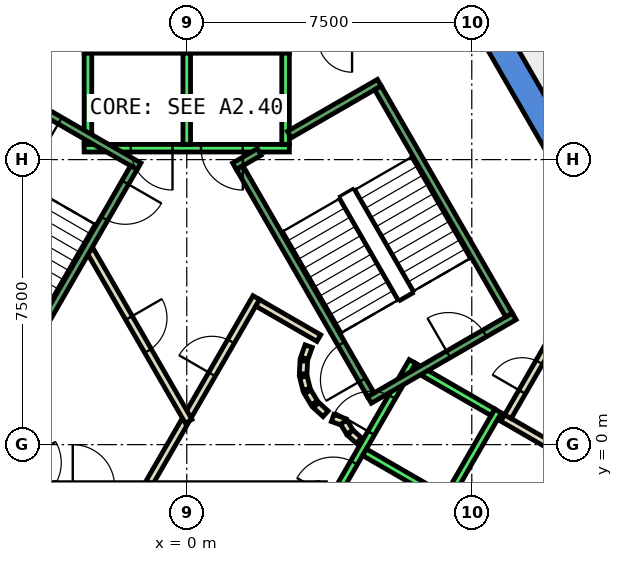
"""IFC4 building model, lengths in metres.
Left out: names, types, materials, properties, quantities, classifications, styles, units other than length and angle.
Written with IfcOpenShell. Run it as: python <this file> out.ifc"""

import sys

from ifc_helpers import new_model, si_unit, direction, frame, frame_2d, origin, place, context, subcontext, project, spatial, polyline, rectangle, outline, extrude, element, fill, save


model = new_model("IFC4")
c1 = context("Model", 3, precision=1e-05, world=origin(), true_north=direction((0.0, 1.0)))
c2 = subcontext(c1, "Body", "Model", "MODEL_VIEW")
j1 = project(units=[si_unit("LENGTHUNIT", "METRE"), si_unit("PLANEANGLEUNIT", "RADIAN")], contexts=[c1])
p1 = place(None, origin())
s1 = spatial("IfcSite", under=j1, at=p1, CompositionType="ELEMENT")
p2 = place(p1, origin())
s2 = spatial("IfcBuilding", under=s1, at=p2, CompositionType="ELEMENT")
p3 = place(p2, frame((0.0, 0.0, 194.0)))
s3 = spatial("IfcBuildingStorey", under=s2, at=p3, CompositionType="ELEMENT", Elevation=194.0)
p4 = place(p3, frame((0.0, 0.0, -0.4)))
e1 = element("IfcWall", 1, at=p4, inside=s3, PredefinedType="SHEAR", context=c2, shape_type="SweptSolid", body=[
    extrude(outline(polyline([(8.084, 11.498), (7.478, 11.148), (12.471, 2.5), (13.279, 2.5), (8.084, 11.498)])), origin(), (0.0, 0.0, 1.0), 4.2),
])
p5 = place(p3, frame((0.0, 0.0, -0.4)))
e2 = element("IfcWall", 2, at=p5, inside=s3, PredefinedType="SHEAR", context=c2, shape_type="SweptSolid", body=[
    extrude(outline(polyline([(6.64, -9.0), (13.279, 2.5), (12.471, 2.5), (6.235, -8.3), (6.64, -9.0)])), origin(), (0.0, 0.0, 1.0), 4.2),
])
p6 = place(p3, frame((10.653, -0.648, 0.0), z_axis=(0.0, 0.0, 1.0), x_axis=(-0.866036505625, 0.499980770555, 0.0)))
e3 = element("IfcWall", 3, at=p6, inside=s3, PredefinedType="PARTITIONING", context=c2, shape_type="SweptSolid", body=[
    extrude(rectangle(XDim=2.7, YDim=0.2, at=frame_2d((1.35, 0.0))), origin(), (0.0, 0.0, 1.0), 3.8),
])
p7 = place(p3, frame((8.451, 0.738, 0.0), z_axis=(0.0, 0.0, 1.0), x_axis=(0.499913221443, 0.866075499611, 0.0)))
e4 = element("IfcWall", 4, at=p7, inside=s3, PredefinedType="PARTITIONING", context=c2, shape_type="SweptSolid", body=[
    extrude(rectangle(XDim=2.4, YDim=0.2, at=frame_2d((1.2, 0.0))), origin(), (0.0, 0.0, 1.0), 3.8),
])
p8 = place(p7, frame((0.75, 0.0, 0.0)))
e5 = element("IfcOpeningElement", 5, at=p8, cuts=e4, PredefinedType="OPENING", context=c2, shape_type="SweptSolid", body=[
    extrude(rectangle(XDim=0.9, YDim=2.1, at=frame_2d((0.45, 1.05))), frame((0.0, 0.11, 0.0), z_axis=(0.0, -1.0, 0.0), x_axis=(1.0, 0.0, 0.0)), (0.0, 0.0, 1.0), 0.22),
])
p9 = place(p3, frame((-0.982, -1.0, 0.0), z_axis=(0.0, 0.0, 1.0), x_axis=(0.50024047865, 0.865886518847, 0.0)))
e6 = element("IfcWall", 6, at=p9, inside=s3, PredefinedType="PARTITIONING", context=c2, shape_type="SweptSolid", body=[
    extrude(rectangle(XDim=1.863, YDim=0.2, at=frame_2d((0.931, 0.0))), origin(), (0.0, 0.0, 1.0), 3.8),
])
p10 = place(p3, frame((0.05, 0.787, 0.0), z_axis=(0.0, 0.0, 1.0), x_axis=(0.499954076797, 0.866051915934, 0.0)))
e7 = element("IfcWall", 7, at=p10, inside=s3, PredefinedType="PARTITIONING", context=c2, shape_type="SweptSolid", body=[
    extrude(rectangle(XDim=3.558, YDim=0.2, at=frame_2d((1.779, 0.0))), origin(), (0.0, 0.0, 1.0), 3.8),
])
p11 = place(p10, frame((1.229, 0.0, 0.0)))
e8 = element("IfcOpeningElement", 8, at=p11, cuts=e7, PredefinedType="OPENING", context=c2, shape_type="SweptSolid", body=[
    extrude(rectangle(XDim=1.0, YDim=2.1, at=frame_2d((0.5, 1.05))), frame((0.0, 0.11, 0.0), z_axis=(0.0, -1.0, 0.0), x_axis=(1.0, 0.0, 0.0)), (0.0, 0.0, 1.0), 0.22),
])
p12 = place(p3, frame((1.866, 3.732, 0.0), z_axis=(0.0, 0.0, 1.0), x_axis=(0.866043361281, -0.499968895414, 0.0)))
e9 = element("IfcWall", 9, at=p12, inside=s3, PredefinedType="PARTITIONING", context=c2, shape_type="SweptSolid", body=[
    extrude(rectangle(XDim=1.858, YDim=0.2, at=frame_2d((0.929, 0.0))), origin(), (0.0, 0.0, 1.0), 3.8),
])
p13 = place(p3, frame((3.208, 2.592, 0.0), z_axis=(0.0, 0.0, 1.0), x_axis=(-0.337388820924, -0.941365382578, 0.0)))
e10 = element("IfcWall", 10, at=p13, inside=s3, PredefinedType="PARTITIONING", context=c2, shape_type="SweptSolid", body=[
    extrude(rectangle(XDim=0.338, YDim=0.2, at=frame_2d((0.169, 0.0))), origin(), (0.0, 0.0, 1.0), 3.8),
])
p14 = place(p3, frame((3.079, 2.199, 0.0), z_axis=(0.0, 0.0, 1.0), x_axis=(-0.047771483479, -0.998858290933, 0.0)))
e11 = element("IfcWall", 11, at=p14, inside=s3, PredefinedType="PARTITIONING", context=c2, shape_type="SweptSolid", body=[
    extrude(rectangle(XDim=0.337, YDim=0.2, at=frame_2d((0.169, 0.0))), origin(), (0.0, 0.0, 1.0), 3.8),
])
p15 = place(p3, frame((3.07, 1.786, 0.0), z_axis=(0.0, 0.0, 1.0), x_axis=(0.242705583207, -0.970099994784, 0.0)))
e12 = element("IfcWall", 12, at=p15, inside=s3, PredefinedType="PARTITIONING", context=c2, shape_type="SweptSolid", body=[
    extrude(rectangle(XDim=0.338, YDim=0.2, at=frame_2d((0.169, 0.0))), origin(), (0.0, 0.0, 1.0), 3.8),
])
for number, where, z_axis, x_axis in (
    (13, (3.182, 1.388, 0.0), (0.0, 0.0, 1.0), (0.512, -0.859, 0.0)),
    (14, (3.404, 1.039, 0.0), (0.0, 0.0, 1.0), (0.74, -0.672, 0.0)),
):
    element("IfcWall", number, at=place(p3, frame(where, z_axis=z_axis, x_axis=x_axis)), inside=s3, PredefinedType="PARTITIONING", context=c2, shape_type="SweptSolid", body=[
        extrude(rectangle(XDim=0.338, YDim=0.2, at=frame_2d((0.169, 0.0))), origin(), (0.0, 0.0, 1.0), 3.8),
    ])
p16 = place(p3, frame((3.838, 0.702, 0.0), z_axis=(0.0, 0.0, 1.0), x_axis=(0.941035081519, -0.338308993895, 0.0)))
e15 = element("IfcWall", 15, at=p16, inside=s3, PredefinedType="PARTITIONING", context=c2, shape_type="SweptSolid", body=[
    extrude(rectangle(XDim=0.337, YDim=0.2, at=frame_2d((0.168, 0.0))), origin(), (0.0, 0.0, 1.0), 3.8),
])
p17 = place(p3, frame((4.132, 0.593, 0.0), z_axis=(0.0, 0.0, 1.0), x_axis=(0.513561617048, -0.858052717201, 0.0)))
e16 = element("IfcWall", 16, at=p17, inside=s3, PredefinedType="PARTITIONING", context=c2, shape_type="SweptSolid", body=[
    extrude(rectangle(XDim=0.308, YDim=0.2, at=frame_2d((0.154, 0.0))), origin(), (0.0, 0.0, 1.0), 3.8),
])
p18 = place(p3, frame((4.301, 0.315, 0.0), z_axis=(0.0, 0.0, 1.0), x_axis=(0.741798017506, -0.670623367639, 0.0)))
e17 = element("IfcWall", 17, at=p18, inside=s3, PredefinedType="PARTITIONING", context=c2, shape_type="SweptSolid", body=[
    extrude(rectangle(XDim=0.309, YDim=0.2, at=frame_2d((0.154, 0.0))), origin(), (0.0, 0.0, 1.0), 3.8),
])
p19 = place(p3, frame((-2.54, 5.1, 0.0), z_axis=(0.0, 0.0, 1.0), x_axis=(0.499925051871, -0.866068670783, 0.0)))
e18 = element("IfcWall", 18, at=p19, inside=s3, PredefinedType="PARTITIONING", context=c2, shape_type="SweptSolid", body=[
    extrude(rectangle(XDim=5.181, YDim=0.2, at=frame_2d((2.59, 0.0))), origin(), (0.0, 0.0, 1.0), 3.8),
])
p20 = place(p19, frame((2.04, 0.0, 0.0)))
e19 = element("IfcOpeningElement", 19, at=p20, cuts=e18, PredefinedType="OPENING", context=c2, shape_type="SweptSolid", body=[
    extrude(rectangle(XDim=1.0, YDim=2.1, at=frame_2d((0.5, 1.05))), frame((0.0, 0.11, 0.0), z_axis=(0.0, -1.0, 0.0), x_axis=(1.0, 0.0, 0.0)), (0.0, 0.0, 1.0), 0.22),
])
p21 = place(p3, frame((2.7, 7.8, 0.0), z_axis=(0.0, 0.0, 1.0), x_axis=(-1.0, 0.0, 0.0)))
e20 = element("IfcWall", 20, at=p21, inside=s3, PredefinedType="STANDARD", context=c2, shape_type="SweptSolid", body=[
    extrude(rectangle(XDim=5.4, YDim=0.2, at=frame_2d((2.7, 0.0))), origin(), (0.0, 0.0, 1.0), 3.8),
])
p22 = place(p21, frame((1.225, 0.0, 0.0)))
e21 = element("IfcOpeningElement", 21, at=p22, cuts=e20, PredefinedType="OPENING", context=c2, shape_type="SweptSolid", body=[
    extrude(rectangle(XDim=1.1, YDim=2.1, at=frame_2d((0.55, 1.05))), frame((0.0, 0.11, 0.0), z_axis=(0.0, -1.0, 0.0), x_axis=(1.0, 0.0, 0.0)), (0.0, 0.0, 1.0), 0.22),
])
p23 = place(p21, frame((3.075, 0.0, 0.0)))
e22 = element("IfcOpeningElement", 22, at=p23, cuts=e20, PredefinedType="OPENING", context=c2, shape_type="SweptSolid", body=[
    extrude(rectangle(XDim=1.1, YDim=2.1, at=frame_2d((0.55, 1.05))), frame((0.0, 0.11, 0.0), z_axis=(0.0, -1.0, 0.0), x_axis=(1.0, 0.0, 0.0)), (0.0, 0.0, 1.0), 0.22),
])
p24 = place(p3, frame((2.7, 10.4, 0.0), z_axis=(0.0, 0.0, 1.0), x_axis=(-1.0, 0.0, 0.0)))
e23 = element("IfcWall", 23, at=p24, inside=s3, PredefinedType="STANDARD", context=c2, shape_type="SweptSolid", body=[
    extrude(rectangle(XDim=5.4, YDim=0.2, at=frame_2d((2.7, 0.0))), origin(), (0.0, 0.0, 1.0), 3.8),
])
for number, where, z_axis, x_axis in (
    (24, (2.6, 7.9, 0.0), (0.0, 0.0, 1.0), (0.0, 1.0, 0.0)),
    (25, (0.0, 7.9, 0.0), (0.0, 0.0, 1.0), (0.0, 1.0, 0.0)),
    (26, (-2.6, 7.9, 0.0), (0.0, 0.0, 1.0), (0.0, 1.0, 0.0)),
):
    element("IfcWall", number, at=place(p3, frame(where, z_axis=z_axis, x_axis=x_axis)), inside=s3, PredefinedType="STANDARD", context=c2, shape_type="SweptSolid", body=[
        extrude(rectangle(XDim=2.4, YDim=0.2, at=frame_2d((1.2, 0.0))), origin(), (0.0, 0.0, 1.0), 3.8),
    ])
p25 = place(p3, frame((-5.94, 2.188, 0.0), z_axis=(0.0, 0.0, 1.0), x_axis=(0.500034260056, -0.866005622828, 0.0)))
e27 = element("IfcWall", 27, at=p25, inside=s3, PredefinedType="STANDARD", context=c2, shape_type="SweptSolid", body=[
    extrude(rectangle(XDim=5.399, YDim=0.2, at=frame_2d((2.7, 0.0))), origin(), (0.0, 0.0, 1.0), 3.8),
])
p26 = place(p25, frame((3.075, 0.0, 0.0)))
e28 = element("IfcOpeningElement", 28, at=p26, cuts=e27, PredefinedType="OPENING", context=c2, shape_type="SweptSolid", body=[
    extrude(rectangle(XDim=1.1, YDim=2.1, at=frame_2d((0.55, 1.05))), frame((0.0, 0.11, 0.0), z_axis=(0.0, -1.0, 0.0), x_axis=(1.0, 0.0, 0.0)), (0.0, 0.0, 1.0), 0.22),
])
p27 = place(p25, frame((1.225, 0.0, 0.0)))
e29 = element("IfcOpeningElement", 29, at=p27, cuts=e27, PredefinedType="OPENING", context=c2, shape_type="SweptSolid", body=[
    extrude(rectangle(XDim=1.1, YDim=2.1, at=frame_2d((0.55, 1.05))), frame((0.0, 0.11, 0.0), z_axis=(0.0, -1.0, 0.0), x_axis=(1.0, 0.0, 0.0)), (0.0, 0.0, 1.0), 0.22),
])
p28 = place(p3, frame((3.24, -2.488, 0.0), z_axis=(0.0, 0.0, 1.0), x_axis=(0.500034260056, 0.866005622828, 0.0)))
e30 = element("IfcWall", 30, at=p28, inside=s3, PredefinedType="STANDARD", context=c2, shape_type="SweptSolid", body=[
    extrude(rectangle(XDim=5.399, YDim=0.2, at=frame_2d((2.7, 0.0))), origin(), (0.0, 0.0, 1.0), 3.8),
])
p29 = place(p28, frame((3.225, 0.0, 0.0)))
e31 = element("IfcOpeningElement", 31, at=p29, cuts=e30, PredefinedType="OPENING", context=c2, shape_type="SweptSolid", body=[
    extrude(rectangle(XDim=1.1, YDim=2.1, at=frame_2d((0.55, 1.05))), frame((0.0, 0.11, 0.0), z_axis=(0.0, -1.0, 0.0), x_axis=(1.0, 0.0, 0.0)), (0.0, 0.0, 1.0), 0.22),
])
p30 = place(p28, frame((1.225, 0.0, 0.0)))
e32 = element("IfcOpeningElement", 32, at=p30, cuts=e30, PredefinedType="OPENING", context=c2, shape_type="SweptSolid", body=[
    extrude(rectangle(XDim=1.1, YDim=2.1, at=frame_2d((0.55, 1.05))), frame((0.0, 0.11, 0.0), z_axis=(0.0, -1.0, 0.0), x_axis=(1.0, 0.0, 0.0)), (0.0, 0.0, 1.0), 0.22),
])
p31 = place(p3, frame((5.492, -3.788, 0.0), z_axis=(0.0, 0.0, 1.0), x_axis=(0.500034260056, 0.866005622828, 0.0)))
e33 = element("IfcWall", 33, at=p31, inside=s3, PredefinedType="STANDARD", context=c2, shape_type="SweptSolid", body=[
    extrude(rectangle(XDim=5.399, YDim=0.2, at=frame_2d((2.7, 0.0))), origin(), (0.0, 0.0, 1.0), 3.8),
])
for number, where, z_axis, x_axis in (
    (34, (4.677, -0.2, 0.0), (0.0, 0.0, 1.0), (0.866, -0.5, 0.0)),
    (35, (5.977, 2.052, 0.0), (0.0, 0.0, 1.0), (0.866, -0.5, 0.0)),
):
    element("IfcWall", number, at=place(p3, frame(where, z_axis=z_axis, x_axis=x_axis)), inside=s3, PredefinedType="STANDARD", context=c2, shape_type="SweptSolid", body=[
        extrude(rectangle(XDim=2.399, YDim=0.2, at=frame_2d((1.2, 0.0))), origin(), (0.0, 0.0, 1.0), 3.8),
    ])
p32 = place(p3, frame((4.806, 1.176, 0.0), z_axis=(0.0, 0.0, 1.0), x_axis=(0.866059941101, 0.499940174841, 0.0)))
e36 = element("IfcWall", 36, at=p32, inside=s3, PredefinedType="STANDARD", context=c2, shape_type="SweptSolid", body=[
    extrude(rectangle(XDim=4.4, YDim=0.2, at=frame_2d((2.2, 0.0))), origin(), (0.0, 0.0, 1.0), 3.8),
])
p33 = place(p32, frame((2.4, 0.0, 0.0)))
e37 = element("IfcOpeningElement", 37, at=p33, cuts=e36, PredefinedType="OPENING", context=c2, shape_type="SweptSolid", body=[
    extrude(rectangle(XDim=1.1, YDim=2.2, at=frame_2d((0.55, 1.1))), frame((0.0, 0.11, 0.0), z_axis=(0.0, -1.0, 0.0), x_axis=(1.0, 0.0, 0.0)), (0.0, 0.0, 1.0), 0.22),
])
p34 = place(p3, frame((2.7, 8.158, 0.0), z_axis=(0.0, 0.0, 1.0), x_axis=(0.86611865017, 0.499838457731, 0.0)))
e38 = element("IfcWall", 38, at=p34, inside=s3, PredefinedType="STANDARD", context=c2, shape_type="SweptSolid", body=[
    extrude(rectangle(XDim=2.733, YDim=0.2, at=frame_2d((1.366, 0.0))), origin(), (0.0, 0.0, 1.0), 3.8),
])
p35 = place(p3, frame((1.256, 7.324, 0.0), z_axis=(0.0, 0.0, 1.0), x_axis=(0.865915093549, 0.500191014278, 0.0)))
e39 = element("IfcWall", 39, at=p35, inside=s3, PredefinedType="STANDARD", context=c2, shape_type="SweptSolid", body=[
    extrude(rectangle(XDim=0.752, YDim=0.2, at=frame_2d((0.376, 0.0))), origin(), (0.0, 0.0, 1.0), 3.8),
])
p36 = place(p3, frame((4.843, 1.312, 0.0), z_axis=(0.0, 0.0, 1.0), x_axis=(-0.499963383562, 0.866046543262, 0.0)))
e40 = element("IfcWall", 40, at=p36, inside=s3, PredefinedType="STANDARD", context=c2, shape_type="SweptSolid", body=[
    extrude(rectangle(XDim=6.9, YDim=0.2, at=frame_2d((3.45, 0.0))), origin(), (0.0, 0.0, 1.0), 3.8),
])
p37 = place(p36, frame((0.45, 0.0, 0.0)))
e41 = element("IfcOpeningElement", 41, at=p37, cuts=e40, PredefinedType="OPENING", context=c2, shape_type="SweptSolid", body=[
    extrude(rectangle(XDim=1.1, YDim=2.2, at=frame_2d((0.55, 1.1))), frame((0.0, 0.11, 0.0), z_axis=(0.0, -1.0, 0.0), x_axis=(1.0, 0.0, 0.0)), (0.0, 0.0, 1.0), 0.22),
])
p38 = place(p3, frame((8.48, 3.412, 0.0), z_axis=(0.0, 0.0, 1.0), x_axis=(-0.499978703459, 0.866037698999, 0.0)))
e42 = element("IfcWall", 42, at=p38, inside=s3, PredefinedType="STANDARD", context=c2, shape_type="SweptSolid", body=[
    extrude(rectangle(XDim=6.9, YDim=0.2, at=frame_2d((3.45, 0.0))), origin(), (0.0, 0.0, 1.0), 3.8),
])
p39 = place(p3, frame((-1.256, 7.324, 0.0), z_axis=(0.0, 0.0, 1.0), x_axis=(-0.866046073146, 0.499964197906, 0.0)))
e43 = element("IfcWall", 43, at=p39, inside=s3, PredefinedType="STANDARD", context=c2, shape_type="SweptSolid", body=[
    extrude(rectangle(XDim=4.4, YDim=0.2, at=frame_2d((2.2, 0.0))), origin(), (0.0, 0.0, 1.0), 3.8),
])
p40 = place(p39, frame((2.4, 0.0, 0.0)))
e44 = element("IfcOpeningElement", 44, at=p40, cuts=e43, PredefinedType="OPENING", context=c2, shape_type="SweptSolid", body=[
    extrude(rectangle(XDim=1.1, YDim=2.2, at=frame_2d((0.55, 1.1))), frame((0.0, 0.11, 0.0), z_axis=(0.0, -1.0, 0.0), x_axis=(1.0, 0.0, 0.0)), (0.0, 0.0, 1.0), 0.22),
])
p41 = place(p3, frame((-1.393, 7.288, 0.0), z_axis=(0.0, 0.0, 1.0), x_axis=(-0.499963383562, -0.866046543262, 0.0)))
e45 = element("IfcWall", 45, at=p41, inside=s3, PredefinedType="STANDARD", context=c2, shape_type="SweptSolid", body=[
    extrude(rectangle(XDim=6.9, YDim=0.2, at=frame_2d((3.45, 0.0))), origin(), (0.0, 0.0, 1.0), 3.8),
])
p42 = place(p41, frame((0.45, 0.0, 0.0)))
e46 = element("IfcOpeningElement", 46, at=p42, cuts=e45, PredefinedType="OPENING", context=c2, shape_type="SweptSolid", body=[
    extrude(rectangle(XDim=1.1, YDim=2.2, at=frame_2d((0.55, 1.1))), frame((0.0, 0.11, 0.0), z_axis=(0.0, -1.0, 0.0), x_axis=(1.0, 0.0, 0.0)), (0.0, 0.0, 1.0), 0.22),
])
p43 = place(p11, origin())
e47 = element("IfcDoor", 47, at=p43, inside=s3, OperationType="SINGLE_SWING_RIGHT", PredefinedType="DOOR", context=c2, shape_type="SweptSolid", body=[
    extrude(rectangle(XDim=1.0, YDim=2.1, at=frame_2d((0.5, 1.05))), frame((0.0, 0.025, 0.0), z_axis=(0.0, -1.0, 0.0), x_axis=(1.0, 0.0, 0.0)), (0.0, 0.0, 1.0), 0.05),
])
fill(e8, e47)
p44 = place(p20, origin())
e48 = element("IfcDoor", 48, at=p44, inside=s3, OperationType="SINGLE_SWING_RIGHT", PredefinedType="DOOR", context=c2, shape_type="SweptSolid", body=[
    extrude(rectangle(XDim=1.0, YDim=2.1, at=frame_2d((0.5, 1.05))), frame((0.0, 0.025, 0.0), z_axis=(0.0, -1.0, 0.0), x_axis=(1.0, 0.0, 0.0)), (0.0, 0.0, 1.0), 0.05),
])
fill(e19, e48)
p45 = place(p8, origin())
e49 = element("IfcDoor", 49, at=p45, inside=s3, OperationType="SINGLE_SWING_LEFT", PredefinedType="DOOR", context=c2, shape_type="SweptSolid", body=[
    extrude(rectangle(XDim=0.9, YDim=2.1, at=frame_2d((0.45, 1.05))), frame((0.0, 0.025, 0.0), z_axis=(0.0, -1.0, 0.0), x_axis=(1.0, 0.0, 0.0)), (0.0, 0.0, 1.0), 0.05),
])
fill(e5, e49)
p46 = place(p22, origin())
e50 = element("IfcDoor", 50, at=p46, inside=s3, OperationType="SLIDING_TO_LEFT", PredefinedType="DOOR", context=c2, shape_type="SweptSolid", body=[
    extrude(rectangle(XDim=1.1, YDim=2.1, at=frame_2d((0.55, 1.05))), frame((0.0, 0.025, 0.0), z_axis=(0.0, -1.0, 0.0), x_axis=(1.0, 0.0, 0.0)), (0.0, 0.0, 1.0), 0.05),
])
fill(e21, e50)
p47 = place(p23, origin())
e51 = element("IfcDoor", 51, at=p47, inside=s3, OperationType="SLIDING_TO_LEFT", PredefinedType="DOOR", context=c2, shape_type="SweptSolid", body=[
    extrude(rectangle(XDim=1.1, YDim=2.1, at=frame_2d((0.55, 1.05))), frame((0.0, 0.025, 0.0), z_axis=(0.0, -1.0, 0.0), x_axis=(1.0, 0.0, 0.0)), (0.0, 0.0, 1.0), 0.05),
])
fill(e22, e51)
p48 = place(p29, origin())
e52 = element("IfcDoor", 52, at=p48, inside=s3, OperationType="SLIDING_TO_LEFT", PredefinedType="DOOR", context=c2, shape_type="SweptSolid", body=[
    extrude(rectangle(XDim=1.1, YDim=2.1, at=frame_2d((0.55, 1.05))), frame((0.0, 0.025, 0.0), z_axis=(0.0, -1.0, 0.0), x_axis=(1.0, 0.0, 0.0)), (0.0, 0.0, 1.0), 0.05),
])
fill(e31, e52)
p49 = place(p30, origin())
e53 = element("IfcDoor", 53, at=p49, inside=s3, OperationType="SLIDING_TO_LEFT", PredefinedType="DOOR", context=c2, shape_type="SweptSolid", body=[
    extrude(rectangle(XDim=1.1, YDim=2.1, at=frame_2d((0.55, 1.05))), frame((0.0, 0.025, 0.0), z_axis=(0.0, -1.0, 0.0), x_axis=(1.0, 0.0, 0.0)), (0.0, 0.0, 1.0), 0.05),
])
fill(e32, e53)
p50 = place(p37, origin())
e54 = element("IfcDoor", 54, at=p50, inside=s3, OperationType="SINGLE_SWING_LEFT", PredefinedType="DOOR", context=c2, shape_type="SweptSolid", body=[
    extrude(rectangle(XDim=1.1, YDim=2.2, at=frame_2d((0.55, 1.1))), frame((0.0, 0.025, 0.0), z_axis=(0.0, -1.0, 0.0), x_axis=(1.0, 0.0, 0.0)), (0.0, 0.0, 1.0), 0.05),
])
fill(e41, e54)
p51 = place(p33, origin())
e55 = element("IfcDoor", 55, at=p51, inside=s3, OperationType="SINGLE_SWING_LEFT", PredefinedType="DOOR", context=c2, shape_type="SweptSolid", body=[
    extrude(rectangle(XDim=1.1, YDim=2.2, at=frame_2d((0.55, 1.1))), frame((0.0, 0.025, 0.0), z_axis=(0.0, -1.0, 0.0), x_axis=(1.0, 0.0, 0.0)), (0.0, 0.0, 1.0), 0.05),
])
fill(e37, e55)
p52 = place(p42, origin())
e56 = element("IfcDoor", 56, at=p52, inside=s3, OperationType="SINGLE_SWING_LEFT", PredefinedType="DOOR", context=c2, shape_type="SweptSolid", body=[
    extrude(rectangle(XDim=1.1, YDim=2.2, at=frame_2d((0.55, 1.1))), frame((0.0, 0.025, 0.0), z_axis=(0.0, -1.0, 0.0), x_axis=(1.0, 0.0, 0.0)), (0.0, 0.0, 1.0), 0.05),
])
fill(e46, e56)
p53 = place(p40, origin())
e57 = element("IfcDoor", 57, at=p53, inside=s3, OperationType="SINGLE_SWING_LEFT", PredefinedType="DOOR", context=c2, shape_type="SweptSolid", body=[
    extrude(rectangle(XDim=1.1, YDim=2.2, at=frame_2d((0.55, 1.1))), frame((0.0, 0.025, 0.0), z_axis=(0.0, -1.0, 0.0), x_axis=(1.0, 0.0, 0.0)), (0.0, 0.0, 1.0), 0.05),
])
fill(e44, e57)
save(model, sys.argv[1])
